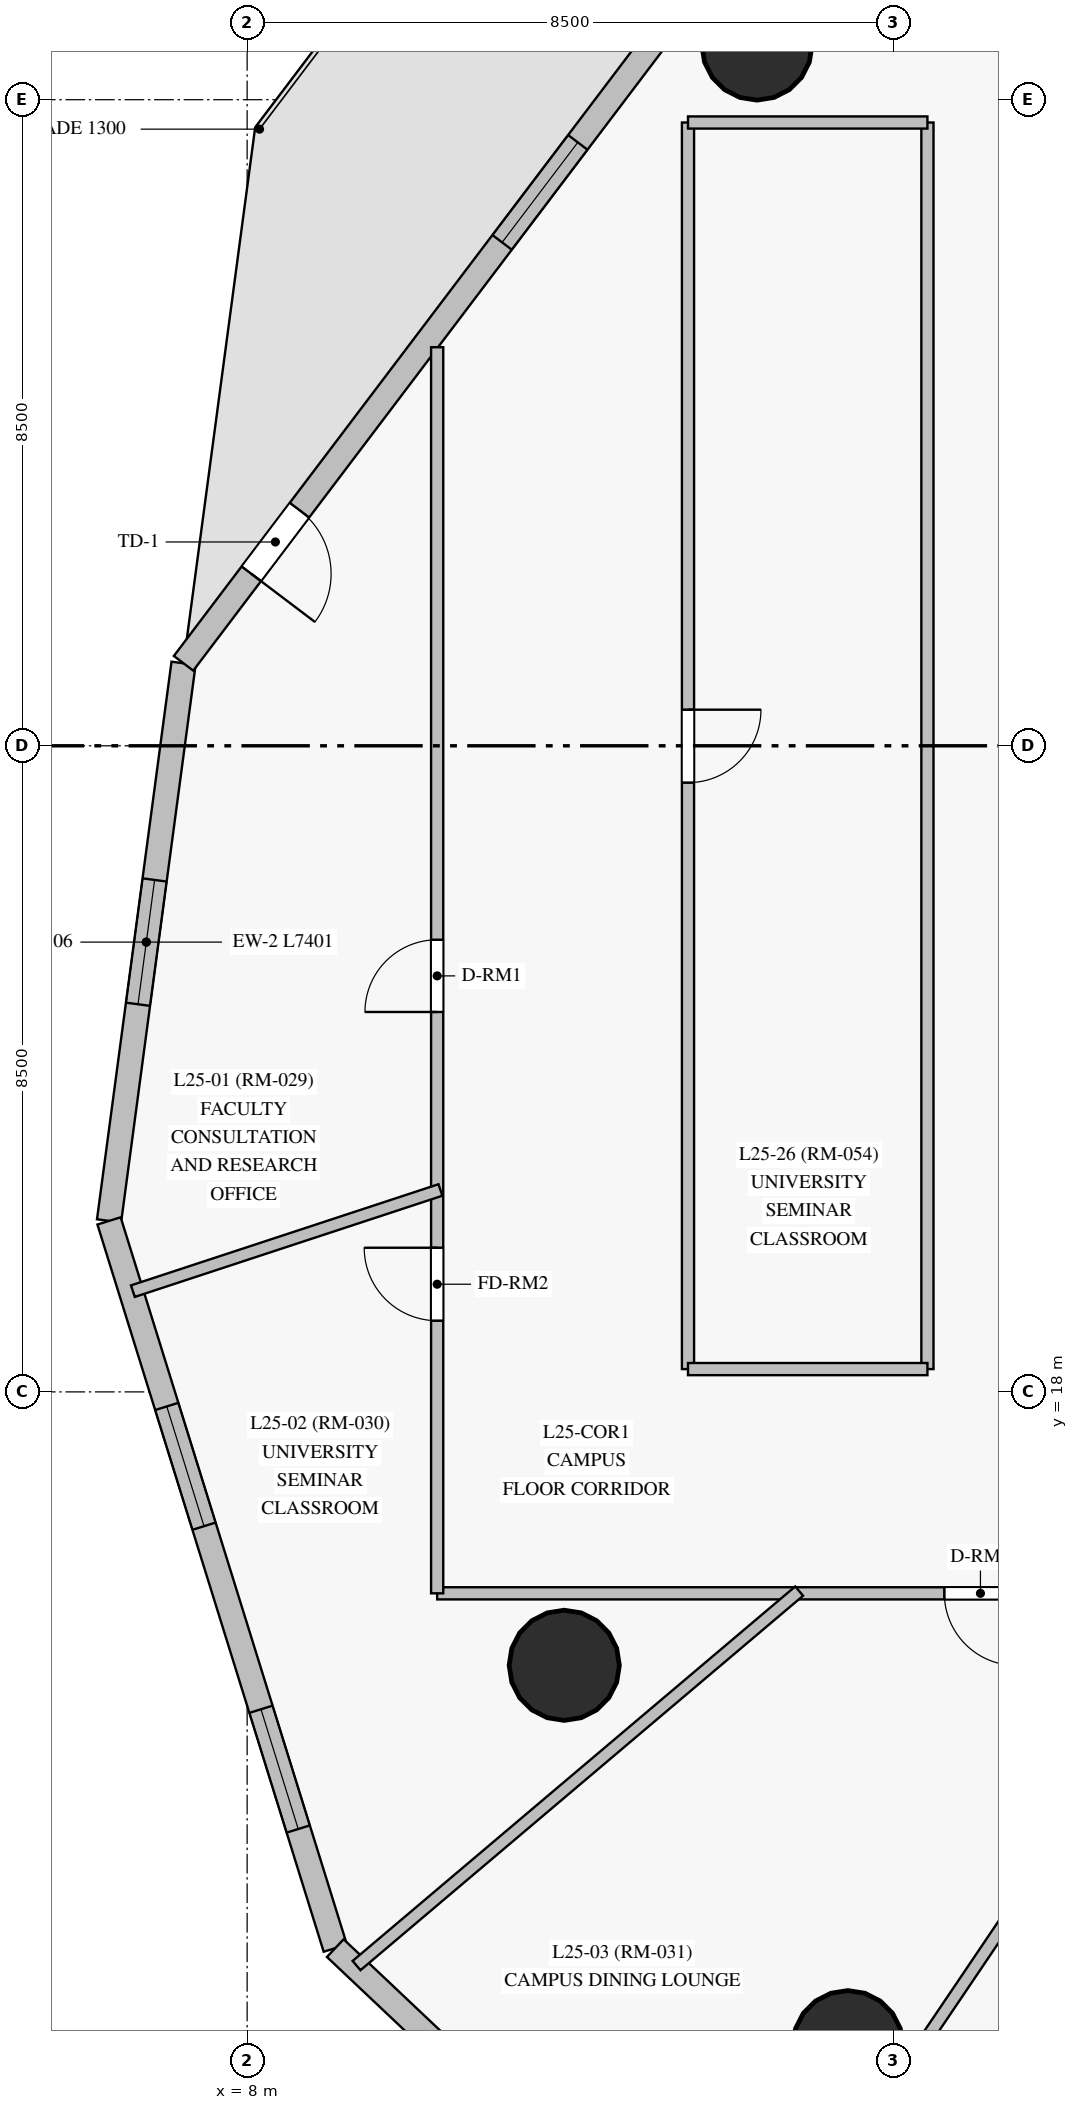
"""IFC4 building model, lengths in metres.
Left out: names, types, materials, properties, quantities, classifications, styles, units other than length and angle.
Written with IfcOpenShell. Run it as: python <this file> out.ifc"""

import sys

from ifc_helpers import new_model, si_unit, direction, frame, frame_2d, origin, origin_with_axes, origin_2d, place, context, subcontext, project, spatial, rectangle, circle, extrude, source, transform, mapped, element, fill, save


model = new_model("IFC4")
c1 = context("Model", 3, precision=1e-05, world=origin(), true_north=direction((0.0, 1.0)))
c2 = subcontext(c1, "Body", "Model", "MODEL_VIEW")
j1 = project(units=[si_unit("LENGTHUNIT", "METRE"), si_unit("PLANEANGLEUNIT", "RADIAN")], contexts=[c1])
p1 = place(None, origin())
s1 = spatial("IfcSite", under=j1, at=p1, CompositionType="ELEMENT")
p2 = place(p1, origin())
s2 = spatial("IfcBuilding", under=s1, at=p2, CompositionType="ELEMENT")
p3 = place(p2, frame((0.0, 0.0, 96.2)))
s3 = spatial("IfcBuildingStorey", under=s2, at=p3, CompositionType="ELEMENT", Elevation=96.2)
m1 = source(origin_with_axes(), c2, "Body", "SweptSolid", [
    extrude(circle(Radius=0.725, at=origin_2d()), origin(), (0.0, 0.0, 1.0), 3.05),
])
for number, where, z_axis, x_axis in (
    (1, (14.707, 35.719, 0.0), (0.0, 0.0, 1.0), (1.0, 0.0, 0.0)),
    (2, (12.172, 14.403, 0.0), (0.0, 0.0, 1.0), (1.0, 0.0, 0.0)),
    (3, (15.904, 9.399, 0.0), (0.0, 0.0, 1.0), (1.0, 0.0, 0.0)),
):
    element("IfcColumn", number, at=place(p3, frame(where, z_axis=z_axis, x_axis=x_axis)), inside=s3, PredefinedType="COLUMN", context=c2, shape_type="MappedRepresentation", body=[
        mapped(m1, transform((0.0, 0.0, 0.0), scale=1.0)),
    ])
p4 = place(p3, frame((7.164, 27.585, 0.0), z_axis=(0.0, 0.0, 1.0), x_axis=(-0.132479186678, -0.991185787377, 0.0)))
e4 = element("IfcWall", 4, at=p4, inside=s3, PredefinedType="SOLIDWALL", context=c2, shape_type="SweptSolid", body=[
    extrude(rectangle(XDim=7.401, YDim=0.32, at=frame_2d((3.7, 0.0))), origin(), (0.0, 0.0, 1.0), 2.825),
])
p5 = place(p4, frame((2.875, 0.0, 0.85)))
e5 = element("IfcOpeningElement", 5, at=p5, cuts=e4, PredefinedType="OPENING", context=c2, shape_type="SweptSolid", body=[
    extrude(rectangle(XDim=1.65, YDim=1.65, at=frame_2d((0.825, 0.825))), frame((0.0, 0.17, 0.0), z_axis=(0.0, -1.0, 0.0), x_axis=(1.0, 0.0, 0.0)), (0.0, 0.0, 1.0), 0.34),
])
p6 = place(p3, frame((6.183, 20.25, 0.0), z_axis=(0.0, 0.0, 1.0), x_axis=(0.297070502101, -0.954855547599, 0.0)))
e6 = element("IfcWall", 6, at=p6, inside=s3, PredefinedType="SOLIDWALL", context=c2, shape_type="SweptSolid", body=[
    extrude(rectangle(XDim=10.02, YDim=0.32, at=frame_2d((5.01, 0.0))), origin(), (0.0, 0.0, 1.0), 2.825),
])
p7 = place(p6, frame((2.556, 0.0, 0.85)))
e7 = element("IfcOpeningElement", 7, at=p7, cuts=e6, PredefinedType="OPENING", context=c2, shape_type="SweptSolid", body=[
    extrude(rectangle(XDim=1.65, YDim=1.65, at=frame_2d((0.825, 0.825))), frame((0.0, 0.17, 0.0), z_axis=(0.0, -1.0, 0.0), x_axis=(1.0, 0.0, 0.0)), (0.0, 0.0, 1.0), 0.34),
])
p8 = place(p6, frame((6.729, 0.0, 0.85)))
e8 = element("IfcOpeningElement", 8, at=p8, cuts=e6, PredefinedType="OPENING", context=c2, shape_type="SweptSolid", body=[
    extrude(rectangle(XDim=1.65, YDim=1.65, at=frame_2d((0.825, 0.825))), frame((0.0, 0.17, 0.0), z_axis=(0.0, -1.0, 0.0), x_axis=(1.0, 0.0, 0.0)), (0.0, 0.0, 1.0), 0.34),
])
p9 = place(p3, frame((9.16, 10.682, 0.0), z_axis=(0.0, 0.0, 1.0), x_axis=(0.726725897384, -0.686927558096, 0.0)))
e9 = element("IfcWall", 9, at=p9, inside=s3, PredefinedType="SOLIDWALL", context=c2, shape_type="SweptSolid", body=[
    extrude(rectangle(XDim=12.471, YDim=0.32, at=frame_2d((6.236, 0.0))), origin(), (0.0, 0.0, 1.0), 2.825),
])
p10 = place(p9, frame((2.956, 0.0, 0.85)))
e10 = element("IfcOpeningElement", 10, at=p10, cuts=e9, PredefinedType="OPENING", context=c2, shape_type="SweptSolid", body=[
    extrude(rectangle(XDim=1.65, YDim=1.65, at=frame_2d((0.825, 0.825))), frame((0.0, 0.17, 0.0), z_axis=(0.0, -1.0, 0.0), x_axis=(1.0, 0.0, 0.0)), (0.0, 0.0, 1.0), 0.34),
])
p11 = place(p9, frame((8.173, 0.0, 0.85)))
e11 = element("IfcOpeningElement", 11, at=p11, cuts=e9, PredefinedType="OPENING", context=c2, shape_type="SweptSolid", body=[
    extrude(rectangle(XDim=1.65, YDim=1.65, at=frame_2d((0.825, 0.825))), frame((0.0, 0.17, 0.0), z_axis=(0.0, -1.0, 0.0), x_axis=(1.0, 0.0, 0.0)), (0.0, 0.0, 1.0), 0.34),
])
p12 = place(p3, frame((21.66, 46.74, 0.0), z_axis=(0.0, 0.0, 1.0), x_axis=(-0.603487207486, -0.797372679743, 0.0)))
e12 = element("IfcWall", 12, at=p12, inside=s3, PredefinedType="SOLIDWALL", context=c2, shape_type="SweptSolid", body=[
    extrude(rectangle(XDim=24.022, YDim=0.32, at=frame_2d((12.011, 0.0))), origin(), (0.0, 0.0, 1.0), 2.825),
])
p13 = place(p12, frame((1.101, 0.0, 0.85)))
e13 = element("IfcOpeningElement", 13, at=p13, cuts=e12, PredefinedType="OPENING", context=c2, shape_type="SweptSolid", body=[
    extrude(rectangle(XDim=1.65, YDim=1.65, at=frame_2d((0.825, 0.825))), frame((0.0, 0.17, 0.0), z_axis=(0.0, -1.0, 0.0), x_axis=(1.0, 0.0, 0.0)), (0.0, 0.0, 1.0), 0.34),
])
p14 = place(p12, frame((5.462, 0.0, 0.85)))
e14 = element("IfcOpeningElement", 14, at=p14, cuts=e12, PredefinedType="OPENING", context=c2, shape_type="SweptSolid", body=[
    extrude(rectangle(XDim=1.65, YDim=1.65, at=frame_2d((0.825, 0.825))), frame((0.0, 0.17, 0.0), z_axis=(0.0, -1.0, 0.0), x_axis=(1.0, 0.0, 0.0)), (0.0, 0.0, 1.0), 0.34),
])
p15 = place(p12, frame((15.427, 0.0, 0.85)))
e15 = element("IfcOpeningElement", 15, at=p15, cuts=e12, PredefinedType="OPENING", context=c2, shape_type="SweptSolid", body=[
    extrude(rectangle(XDim=1.65, YDim=1.65, at=frame_2d((0.825, 0.825))), frame((0.0, 0.17, 0.0), z_axis=(0.0, -1.0, 0.0), x_axis=(1.0, 0.0, 0.0)), (0.0, 0.0, 1.0), 0.34),
])
p16 = place(p12, frame((21.495, 0.0, 0.0)))
e16 = element("IfcOpeningElement", 16, at=p16, cuts=e12, PredefinedType="OPENING", context=c2, shape_type="SweptSolid", body=[
    extrude(rectangle(XDim=1.05, YDim=2.12, at=frame_2d((0.525, 1.06))), frame((0.0, 0.17, 0.0), z_axis=(0.0, -1.0, 0.0), x_axis=(1.0, 0.0, 0.0)), (0.0, 0.0, 1.0), 0.34),
])
p17 = place(p3, frame((40.25, 15.35, 0.0), z_axis=(0.0, 0.0, 1.0), x_axis=(-1.0, 0.0, 0.0)))
e17 = element("IfcWall", 17, at=p17, inside=s3, PredefinedType="PARTITIONING", context=c2, shape_type="SweptSolid", body=[
    extrude(rectangle(XDim=29.75, YDim=0.16, at=frame_2d((14.875, 0.0))), origin(), (0.0, 0.0, 1.0), 2.225),
])
p18 = place(p17, frame((22.127, 0.0, 0.0)))
e18 = element("IfcOpeningElement", 18, at=p18, cuts=e17, PredefinedType="OPENING", context=c2, shape_type="SweptSolid", body=[
    extrude(rectangle(XDim=0.95, YDim=2.15, at=frame_2d((0.475, 1.075))), frame((0.0, 0.09, 0.0), z_axis=(0.0, -1.0, 0.0), x_axis=(1.0, 0.0, 0.0)), (0.0, 0.0, 1.0), 0.18),
])
p19 = place(p17, frame((14.4, 0.0, 0.0)))
e19 = element("IfcOpeningElement", 19, at=p19, cuts=e17, PredefinedType="OPENING", context=c2, shape_type="SweptSolid", body=[
    extrude(rectangle(XDim=0.96, YDim=2.15, at=frame_2d((0.48, 1.075))), frame((0.0, 0.09, 0.0), z_axis=(0.0, -1.0, 0.0), x_axis=(1.0, 0.0, 0.0)), (0.0, 0.0, 1.0), 0.18),
])
p20 = place(p17, frame((10.127, 0.0, 0.0)))
e20 = element("IfcOpeningElement", 20, at=p20, cuts=e17, PredefinedType="OPENING", context=c2, shape_type="SweptSolid", body=[
    extrude(rectangle(XDim=0.96, YDim=2.15, at=frame_2d((0.48, 1.075))), frame((0.0, 0.09, 0.0), z_axis=(0.0, -1.0, 0.0), x_axis=(1.0, 0.0, 0.0)), (0.0, 0.0, 1.0), 0.18),
])
p21 = place(p17, frame((8.158, 0.0, 0.0)))
e21 = element("IfcOpeningElement", 21, at=p21, cuts=e17, PredefinedType="OPENING", context=c2, shape_type="SweptSolid", body=[
    extrude(rectangle(XDim=0.95, YDim=2.15, at=frame_2d((0.475, 1.075))), frame((0.0, 0.09, 0.0), z_axis=(0.0, -1.0, 0.0), x_axis=(1.0, 0.0, 0.0)), (0.0, 0.0, 1.0), 0.18),
])
p22 = place(p17, frame((3.353, 0.0, 0.0)))
e22 = element("IfcOpeningElement", 22, at=p22, cuts=e17, PredefinedType="OPENING", context=c2, shape_type="SweptSolid", body=[
    extrude(rectangle(XDim=0.96, YDim=2.15, at=frame_2d((0.48, 1.075))), frame((0.0, 0.09, 0.0), z_axis=(0.0, -1.0, 0.0), x_axis=(1.0, 0.0, 0.0)), (0.0, 0.0, 1.0), 0.18),
])
p23 = place(p3, frame((13.8, 34.7, 0.0), z_axis=(0.0, 0.0, 1.0), x_axis=(0.0, -1.0, 0.0)))
e23 = element("IfcWall", 23, at=p23, inside=s3, PredefinedType="PARTITIONING", context=c2, shape_type="SweptSolid", body=[
    extrude(rectangle(XDim=16.4, YDim=0.16, at=frame_2d((8.2, 0.0))), origin(), (0.0, 0.0, 1.0), 2.225),
])
p24 = place(p23, frame((7.725, 0.0, 0.0)))
e24 = element("IfcOpeningElement", 24, at=p24, cuts=e23, PredefinedType="OPENING", context=c2, shape_type="SweptSolid", body=[
    extrude(rectangle(XDim=0.96, YDim=2.15, at=frame_2d((0.48, 1.075))), frame((0.0, 0.09, 0.0), z_axis=(0.0, -1.0, 0.0), x_axis=(1.0, 0.0, 0.0)), (0.0, 0.0, 1.0), 0.18),
])
p25 = place(p3, frame((16.95, 18.3, 0.0), z_axis=(0.0, 0.0, 1.0), x_axis=(0.0, 1.0, 0.0)))
e25 = element("IfcWall", 25, at=p25, inside=s3, PredefinedType="PARTITIONING", context=c2, shape_type="SweptSolid", body=[
    extrude(rectangle(XDim=16.4, YDim=0.16, at=frame_2d((8.2, 0.0))), origin(), (0.0, 0.0, 1.0), 2.325),
])
p26 = place(p3, frame((10.5, 15.35, 0.0), z_axis=(0.0, 0.0, 1.0), x_axis=(0.0, 1.0, 0.0)))
e26 = element("IfcWall", 26, at=p26, inside=s3, PredefinedType="PARTITIONING", context=c2, shape_type="SweptSolid", body=[
    extrude(rectangle(XDim=16.394, YDim=0.16, at=frame_2d((8.197, 0.0))), origin(), (0.0, 0.0, 1.0), 2.825),
])
p27 = place(p26, frame((7.648, 0.0, 0.0)))
e27 = element("IfcOpeningElement", 27, at=p27, cuts=e26, PredefinedType="OPENING", context=c2, shape_type="SweptSolid", body=[
    extrude(rectangle(XDim=0.95, YDim=2.15, at=frame_2d((0.475, 1.075))), frame((0.0, 0.09, 0.0), z_axis=(0.0, -1.0, 0.0), x_axis=(1.0, 0.0, 0.0)), (0.0, 0.0, 1.0), 0.18),
])
p28 = place(p26, frame((3.586, 0.0, 0.0)))
e28 = element("IfcOpeningElement", 28, at=p28, cuts=e26, PredefinedType="OPENING", context=c2, shape_type="SweptSolid", body=[
    extrude(rectangle(XDim=0.96, YDim=2.15, at=frame_2d((0.48, 1.075))), frame((0.0, 0.09, 0.0), z_axis=(0.0, -1.0, 0.0), x_axis=(1.0, 0.0, 0.0)), (0.0, 0.0, 1.0), 0.18),
])
p29 = place(p3, frame((21.681, 12.744, 0.0), z_axis=(0.0, 0.0, 1.0), x_axis=(-0.440627063777, -0.897690253187, 0.0)))
e29 = element("IfcWall", 29, at=p29, inside=s3, PredefinedType="PARTITIONING", context=c2, shape_type="SweptSolid", body=[
    extrude(rectangle(XDim=10.546, YDim=0.16, at=frame_2d((5.273, 0.0))), origin(), (0.0, 0.0, 1.0), 2.825),
])
p30 = place(p3, frame((15.262, 15.379, 0.0), z_axis=(0.0, 0.0, 1.0), x_axis=(-0.763411780434, -0.645912109729, 0.0)))
e30 = element("IfcWall", 30, at=p30, inside=s3, PredefinedType="PARTITIONING", context=c2, shape_type="SweptSolid", body=[
    extrude(rectangle(XDim=7.628, YDim=0.16, at=frame_2d((3.814, 0.0))), origin(), (0.0, 0.0, 1.0), 2.225),
])
p31 = place(p3, frame((19.875, 13.839, 0.0), z_axis=(0.0, 0.0, 1.0), x_axis=(-0.559775304188, -0.82864444053, 0.0)))
e31 = element("IfcWall", 31, at=p31, inside=s3, PredefinedType="PARTITIONING", context=c2, shape_type="SweptSolid", body=[
    extrude(rectangle(XDim=5.628, YDim=0.16, at=frame_2d((2.814, 0.0))), origin(), (0.0, 0.0, 1.0), 2.825),
])
p32 = place(p31, frame((2.339, 0.0, 0.0)))
e32 = element("IfcOpeningElement", 32, at=p32, cuts=e31, PredefinedType="OPENING", context=c2, shape_type="SweptSolid", body=[
    extrude(rectangle(XDim=0.95, YDim=2.15, at=frame_2d((0.475, 1.075))), frame((0.0, 0.09, 0.0), z_axis=(0.0, -1.0, 0.0), x_axis=(1.0, 0.0, 0.0)), (0.0, 0.0, 1.0), 0.18),
])
p33 = place(p3, frame((10.543, 20.656, 0.0), z_axis=(0.0, 0.0, 1.0), x_axis=(-0.949931162853, -0.312459254689, 0.0)))
e33 = element("IfcWall", 33, at=p33, inside=s3, PredefinedType="PARTITIONING", context=c2, shape_type="SweptSolid", body=[
    extrude(rectangle(XDim=4.259, YDim=0.16, at=frame_2d((2.129, 0.0))), origin(), (0.0, 0.0, 1.0), 2.825),
])
p34 = place(p3, frame((16.95, 34.7, 0.0), z_axis=(0.0, 0.0, 1.0), x_axis=(-1.0, 0.0, 0.0)))
e34 = element("IfcWall", 34, at=p34, inside=s3, PredefinedType="PARTITIONING", context=c2, shape_type="SweptSolid", body=[
    extrude(rectangle(XDim=3.15, YDim=0.16, at=frame_2d((1.575, 0.0))), origin(), (0.0, 0.0, 1.0), 2.225),
])
p35 = place(p3, frame((13.8, 18.3, 0.0), z_axis=(0.0, 0.0, 1.0), x_axis=(1.0, 0.0, 0.0)))
e35 = element("IfcWall", 35, at=p35, inside=s3, PredefinedType="PARTITIONING", context=c2, shape_type="SweptSolid", body=[
    extrude(rectangle(XDim=3.15, YDim=0.16, at=frame_2d((1.575, 0.0))), origin(), (0.0, 0.0, 1.0), 2.825),
])
m2 = source(origin_with_axes(), c2, "Body", "SweptSolid", [
    extrude(rectangle(XDim=1.65, YDim=1.65, at=frame_2d((0.825, 0.825))), frame((0.0, 0.03, 0.0), z_axis=(0.0, -1.0, 0.0), x_axis=(1.0, 0.0, 0.0)), (0.0, 0.0, 1.0), 0.06),
])
p36 = place(p5, origin())
e36 = element("IfcWindow", 36, at=p36, inside=s3, PartitioningType="SINGLE_PANEL", PredefinedType="WINDOW", context=c2, shape_type="MappedRepresentation", body=[
    mapped(m2, transform((0.0, 0.0, 0.0), scale=1.0)),
])
fill(e5, e36)
p37 = place(p7, origin())
e37 = element("IfcWindow", 37, at=p37, inside=s3, PartitioningType="SINGLE_PANEL", PredefinedType="WINDOW", context=c2, shape_type="MappedRepresentation", body=[
    mapped(m2, transform((0.0, 0.0, 0.0), scale=1.0)),
])
fill(e7, e37)
p38 = place(p8, origin())
e38 = element("IfcWindow", 38, at=p38, inside=s3, PartitioningType="SINGLE_PANEL", PredefinedType="WINDOW", context=c2, shape_type="MappedRepresentation", body=[
    mapped(m2, transform((0.0, 0.0, 0.0), scale=1.0)),
])
fill(e8, e38)
p39 = place(p15, origin())
e39 = element("IfcWindow", 39, at=p39, inside=s3, PartitioningType="SINGLE_PANEL", PredefinedType="WINDOW", context=c2, shape_type="MappedRepresentation", body=[
    mapped(m2, transform((0.0, 0.0, 0.0), scale=1.0)),
])
fill(e15, e39)
m3 = source(origin_with_axes(), c2, "Body", "SweptSolid", [
    extrude(rectangle(XDim=1.05, YDim=2.12, at=frame_2d((0.525, 1.06))), frame((0.0, 0.025, 0.0), z_axis=(0.0, -1.0, 0.0), x_axis=(1.0, 0.0, 0.0)), (0.0, 0.0, 1.0), 0.05),
])
p40 = place(p16, origin())
e40 = element("IfcDoor", 40, at=p40, inside=s3, OperationType="SINGLE_SWING_RIGHT", PredefinedType="DOOR", context=c2, shape_type="MappedRepresentation", body=[
    mapped(m3, transform((0.0, 0.0, 0.0), scale=1.0)),
])
fill(e16, e40)
m4 = source(origin_with_axes(), c2, "Body", "SweptSolid", [
    extrude(rectangle(XDim=0.95, YDim=2.15, at=frame_2d((0.475, 1.075))), frame((0.0, 0.025, 0.0), z_axis=(0.0, -1.0, 0.0), x_axis=(1.0, 0.0, 0.0)), (0.0, 0.0, 1.0), 0.05),
])
p41 = place(p27, origin())
e41 = element("IfcDoor", 41, at=p41, inside=s3, OperationType="SINGLE_SWING_LEFT", PredefinedType="DOOR", context=c2, shape_type="MappedRepresentation", body=[
    mapped(m4, transform((0.0, 0.0, 0.0), scale=1.0)),
])
fill(e27, e41)
m5 = source(origin_with_axes(), c2, "Body", "SweptSolid", [
    extrude(rectangle(XDim=0.96, YDim=2.15, at=frame_2d((0.48, 1.075))), frame((0.0, 0.025, 0.0), z_axis=(0.0, -1.0, 0.0), x_axis=(1.0, 0.0, 0.0)), (0.0, 0.0, 1.0), 0.05),
])
p42 = place(p28, origin())
e42 = element("IfcDoor", 42, at=p42, inside=s3, OperationType="SINGLE_SWING_RIGHT", PredefinedType="DOOR", context=c2, shape_type="MappedRepresentation", body=[
    mapped(m5, transform((0.0, 0.0, 0.0), scale=1.0)),
])
fill(e28, e42)
p43 = place(p18, origin())
e43 = element("IfcDoor", 43, at=p43, inside=s3, OperationType="SINGLE_SWING_LEFT", PredefinedType="DOOR", context=c2, shape_type="MappedRepresentation", body=[
    mapped(m4, transform((0.0, 0.0, 0.0), scale=1.0)),
])
fill(e18, e43)
p44 = place(p24, origin())
e44 = element("IfcDoor", 44, at=p44, inside=s3, OperationType="SINGLE_SWING_LEFT", PredefinedType="DOOR", context=c2, shape_type="MappedRepresentation", body=[
    mapped(m5, transform((0.0, 0.0, 0.0), scale=1.0)),
])
fill(e24, e44)
save(model, sys.argv[1])
